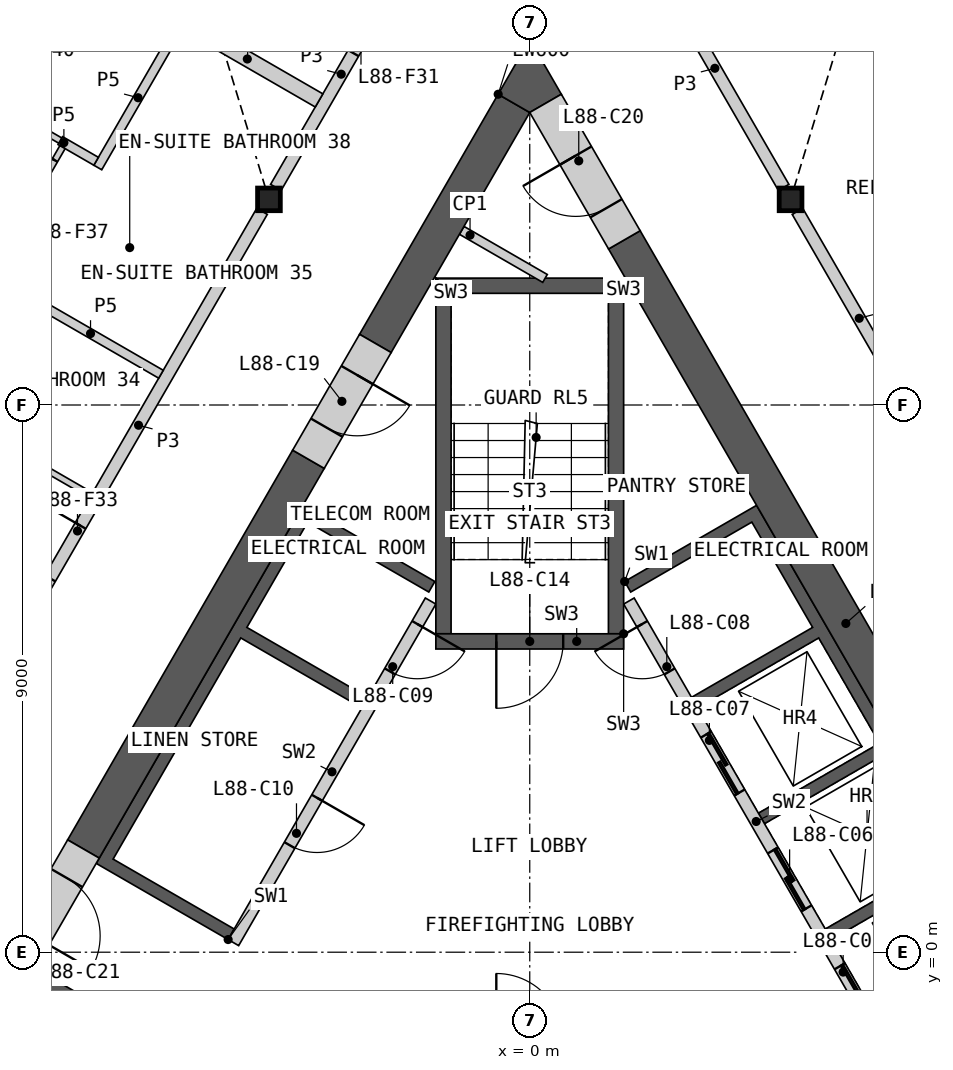
"""IFC4 building model, lengths in metres.
Left out: names, types, materials, properties, quantities, classifications, styles, units other than length and angle.
Written with IfcOpenShell. Run it as: python <this file> out.ifc"""

import sys

from ifc_helpers import new_model, si_unit, direction, frame, frame_2d, origin, origin_2d, place, context, subcontext, project, spatial, polyline, rectangle, i_section, outline, extrude, element, fill, save


model = new_model("IFC4")
c1 = context("Model", 3, precision=1e-05, world=origin(), true_north=direction((0.0, 1.0)))
c2 = subcontext(c1, "Body", "Model", "MODEL_VIEW")
j1 = project(units=[si_unit("LENGTHUNIT", "METRE"), si_unit("PLANEANGLEUNIT", "RADIAN")], contexts=[c1])
p1 = place(None, origin())
s1 = spatial("IfcSite", under=j1, at=p1, CompositionType="ELEMENT")
p2 = place(p1, origin())
s2 = spatial("IfcBuilding", under=s1, at=p2, CompositionType="ELEMENT")
p3 = place(p2, frame((0.0, 0.0, 388.2)))
s3 = spatial("IfcBuildingStorey", under=s2, at=p3, CompositionType="ELEMENT", Elevation=388.2)
for number, where, z_axis, x_axis in (
    (1, (-4.289, 12.382, 0.0), (0.0, 0.0, 1.0), (1.0, 0.0, 0.0)),
    (2, (4.289, 12.382, 0.0), (0.0, 0.0, 1.0), (1.0, 0.0, 0.0)),
):
    element("IfcColumn", number, at=place(p3, frame(where, z_axis=z_axis, x_axis=x_axis)), inside=s3, PredefinedType="COLUMN", context=c2, shape_type="SweptSolid", body=[
        extrude(i_section(OverallWidth=0.374, OverallDepth=0.372, WebThickness=0.016, FlangeThickness=0.026, at=origin_2d()), origin(), (0.0, 0.0, 1.0), 3.4),
    ])
p4 = place(p3, origin())
e3 = element("IfcWall", 3, at=p4, inside=s3, PredefinedType="SHEAR", context=c2, shape_type="SweptSolid", body=[
    extrude(outline(polyline([(1.561, 6.097), (3.731, 7.35), (8.231, -0.444), (6.061, -1.697), (5.96, -1.524), (7.952, -0.374), (6.952, 1.358), (4.96, 0.208), (4.861, 0.381), (6.852, 1.531), (5.852, 3.263), (3.861, 2.113), (3.76, 2.287), (5.752, 3.437), (4.752, 5.169), (2.76, 4.019), (2.66, 4.192), (4.652, 5.342), (3.652, 7.074), (1.66, 5.924), (1.561, 6.097)])), origin(), (0.0, 0.0, 1.0), 3.1),
])
p5 = place(p3, frame((5.817, -1.476, 0.0), z_axis=(0.0, 0.0, 1.0), x_axis=(-0.500002616675, 0.866023893041, 0.0)))
e4 = element("IfcWall", 4, at=p5, inside=s3, PredefinedType="SOLIDWALL", context=c2, shape_type="SweptSolid", body=[
    extrude(rectangle(XDim=8.373, YDim=0.2, at=frame_2d((4.187, 0.0))), origin(), (0.0, 0.0, 1.0), 3.1),
])
p6 = place(p5, frame((0.337, 0.0, 0.0)))
e5 = element("IfcOpeningElement", 5, at=p6, cuts=e4, PredefinedType="OPENING", context=c2, shape_type="SweptSolid", body=[
    extrude(rectangle(XDim=1.1, YDim=2.1, at=frame_2d((0.55, 1.05))), frame((0.0, 0.11, 0.0), z_axis=(0.0, -1.0, 0.0), x_axis=(1.0, 0.0, 0.0)), (0.0, 0.0, 1.0), 0.22),
])
p7 = place(p5, frame((2.537, 0.0, 0.0)))
e6 = element("IfcOpeningElement", 6, at=p7, cuts=e4, PredefinedType="OPENING", context=c2, shape_type="SweptSolid", body=[
    extrude(rectangle(XDim=1.1, YDim=2.1, at=frame_2d((0.55, 1.05))), frame((0.0, 0.11, 0.0), z_axis=(0.0, -1.0, 0.0), x_axis=(1.0, 0.0, 0.0)), (0.0, 0.0, 1.0), 0.22),
])
p8 = place(p5, frame((4.737, 0.0, 0.0)))
e7 = element("IfcOpeningElement", 7, at=p8, cuts=e4, PredefinedType="OPENING", context=c2, shape_type="SweptSolid", body=[
    extrude(rectangle(XDim=1.1, YDim=2.1, at=frame_2d((0.55, 1.05))), frame((0.0, 0.11, 0.0), z_axis=(0.0, -1.0, 0.0), x_axis=(1.0, 0.0, 0.0)), (0.0, 0.0, 1.0), 0.22),
])
p9 = place(p5, frame((7.037, 0.0, 0.0)))
e8 = element("IfcOpeningElement", 8, at=p9, cuts=e4, PredefinedType="OPENING", context=c2, shape_type="SweptSolid", body=[
    extrude(rectangle(XDim=0.9, YDim=2.1, at=frame_2d((0.45, 1.05))), frame((0.0, 0.11, 0.0), z_axis=(0.0, -1.0, 0.0), x_axis=(1.0, 0.0, 0.0)), (0.0, 0.0, 1.0), 0.22),
])
p10 = place(p3, origin())
e9 = element("IfcWall", 9, at=p10, inside=s3, PredefinedType="SHEAR", context=c2, shape_type="SweptSolid", body=[
    extrude(outline(polyline([(-6.061, -1.697), (-8.231, -0.444), (-8.131, -0.271), (-5.96, -1.524), (-6.061, -1.697)])), origin(), (0.0, 0.0, 1.0), 3.1),
])
p11 = place(p3, origin())
e10 = element("IfcWall", 10, at=p11, inside=s3, PredefinedType="SHEAR", context=c2, shape_type="SweptSolid", body=[
    extrude(outline(polyline([(-4.96, 0.208), (-7.131, 1.461), (-3.731, 7.35), (-1.561, 6.097), (-1.66, 5.924), (-3.652, 7.074), (-4.652, 5.342), (-2.66, 4.192), (-2.76, 4.019), (-4.752, 5.169), (-6.852, 1.531), (-4.861, 0.381), (-4.96, 0.208)])), origin(), (0.0, 0.0, 1.0), 3.1),
])
p12 = place(p3, frame((-1.631, 5.776, 0.0), z_axis=(0.0, 0.0, 1.0), x_axis=(-0.499992876559, -0.866029516466, 0.0)))
e11 = element("IfcWall", 11, at=p12, inside=s3, PredefinedType="SOLIDWALL", context=c2, shape_type="SweptSolid", body=[
    extrude(rectangle(XDim=6.486, YDim=0.2, at=frame_2d((3.243, 0.0))), origin(), (0.0, 0.0, 1.0), 3.1),
])
p13 = place(p12, frame((0.437, 0.0, 0.0)))
e12 = element("IfcOpeningElement", 12, at=p13, cuts=e11, PredefinedType="OPENING", context=c2, shape_type="SweptSolid", body=[
    extrude(rectangle(XDim=0.9, YDim=2.1, at=frame_2d((0.45, 1.05))), frame((0.0, 0.11, 0.0), z_axis=(0.0, -1.0, 0.0), x_axis=(1.0, 0.0, 0.0)), (0.0, 0.0, 1.0), 0.22),
])
p14 = place(p12, frame((3.737, 0.0, 0.0)))
e13 = element("IfcOpeningElement", 13, at=p14, cuts=e11, PredefinedType="OPENING", context=c2, shape_type="SweptSolid", body=[
    extrude(rectangle(XDim=0.9, YDim=2.1, at=frame_2d((0.45, 1.05))), frame((0.0, 0.11, 0.0), z_axis=(0.0, -1.0, 0.0), x_axis=(1.0, 0.0, 0.0)), (0.0, 0.0, 1.0), 0.22),
])
p15 = place(p3, origin())
e14 = element("IfcWall", 14, at=p15, inside=s3, PredefinedType="SHEAR", context=c2, shape_type="SweptSolid", body=[
    extrude(outline(polyline([(1.544, 5.237), (1.544, 11.087), (1.294, 10.837), (1.294, 5.237), (1.544, 5.237)])), origin(), (0.0, 0.0, 1.0), 3.1),
])
p16 = place(p3, origin())
e15 = element("IfcWall", 15, at=p16, inside=s3, PredefinedType="SHEAR", context=c2, shape_type="SweptSolid", body=[
    extrude(outline(polyline([(1.544, 11.087), (-1.544, 11.087), (-1.294, 10.837), (1.294, 10.837), (1.544, 11.087)])), origin(), (0.0, 0.0, 1.0), 3.1),
])
p17 = place(p3, origin())
e16 = element("IfcWall", 16, at=p17, inside=s3, PredefinedType="SHEAR", context=c2, shape_type="SweptSolid", body=[
    extrude(outline(polyline([(-1.294, 10.837), (-1.544, 11.087), (-1.544, 5.237), (-1.294, 5.237), (-1.294, 10.837)])), origin(), (0.0, 0.0, 1.0), 3.1),
])
p18 = place(p3, frame((1.544, 5.112, 0.0), z_axis=(0.0, 0.0, 1.0), x_axis=(-1.0, 0.0, 0.0)))
e17 = element("IfcWall", 17, at=p18, inside=s3, PredefinedType="SHEAR", context=c2, shape_type="SweptSolid", body=[
    extrude(rectangle(XDim=3.088, YDim=0.25, at=frame_2d((1.544, 0.0))), origin(), (0.0, 0.0, 1.0), 3.1),
])
p19 = place(p18, frame((0.994, 0.0, 0.0)))
e18 = element("IfcOpeningElement", 18, at=p19, cuts=e17, PredefinedType="OPENING", context=c2, shape_type="SweptSolid", body=[
    extrude(rectangle(XDim=1.1, YDim=2.1, at=frame_2d((0.55, 1.05))), frame((0.0, 0.135, 0.0), z_axis=(0.0, -1.0, 0.0), x_axis=(1.0, 0.0, 0.0)), (0.0, 0.0, 1.0), 0.27),
])
p20 = place(p3, frame((-1.119, 11.873, 0.0), z_axis=(0.0, 0.0, 1.0), x_axis=(0.865992812752, -0.500056445075, 0.0)))
e19 = element("IfcWall", 19, at=p20, inside=s3, PredefinedType="PARTITIONING", context=c2, shape_type="SweptSolid", body=[
    extrude(rectangle(XDim=1.582, YDim=0.15, at=frame_2d((0.791, 0.0))), origin(), (0.0, 0.0, 1.0), 3.1),
])
p21 = place(p3, frame((8.841, -0.902, 0.0), z_axis=(0.0, 0.0, 1.0), x_axis=(-0.499995618375, 0.866027933502, 0.0)))
e20 = element("IfcWall", 20, at=p21, inside=s3, PredefinedType="SHEAR", context=c2, shape_type="SweptSolid", body=[
    extrude(rectangle(XDim=14.571, YDim=0.6, at=frame_2d((7.285, 0.0))), origin(), (0.0, 0.0, 1.0), 3.1),
])
p22 = place(p3, frame((-3.639, 8.107, 0.0), z_axis=(0.0, 0.0, 1.0), x_axis=(-0.49999180351, -0.866030135978, 0.0)))
e21 = element("IfcWall", 21, at=p22, inside=s3, PredefinedType="SHEAR", context=c2, shape_type="SweptSolid", body=[
    extrude(rectangle(XDim=7.401, YDim=0.6, at=frame_2d((3.701, 0.0))), origin(), (0.0, 0.0, 1.0), 3.1),
])
p23 = place(p3, frame((-0.26, 13.961, 0.0), z_axis=(0.0, 0.0, 1.0), x_axis=(-0.499980485389, -0.866036670257, 0.0)))
e22 = element("IfcWall", 22, at=p23, inside=s3, PredefinedType="SHEAR", context=c2, shape_type="SweptSolid", body=[
    extrude(rectangle(XDim=4.559, YDim=0.6, at=frame_2d((2.28, 0.0))), origin(), (0.0, 0.0, 1.0), 3.1),
])
p24 = place(p3, origin())
e23 = element("IfcWall", 23, at=p24, inside=s3, PredefinedType="SHEAR", context=c2, shape_type="SweptSolid", body=[
    extrude(outline(polyline([(-0.52, 14.111), (0.0, 15.011), (0.52, 14.111), (0.0, 13.811), (-0.52, 14.111)])), origin(), (0.0, 0.0, 1.0), 3.1),
])
p25 = place(p3, frame((-2.539, 10.013, 0.0), z_axis=(0.0, 0.0, 1.0), x_axis=(-0.50002983664, -0.866008176907, 0.0)))
e24 = element("IfcWall", 24, at=p25, inside=s3, PredefinedType="SHEAR", context=c2, shape_type="SweptSolid", body=[
    extrude(rectangle(XDim=2.2, YDim=0.6, at=frame_2d((1.1, 0.0))), origin(), (0.0, 0.0, 1.0), 3.1),
])
p26 = place(p25, frame((0.6, 0.0, 0.0)))
e25 = element("IfcOpeningElement", 25, at=p26, cuts=e24, PredefinedType="OPENING", context=c2, shape_type="SweptSolid", body=[
    extrude(rectangle(XDim=1.0, YDim=2.1, at=frame_2d((0.5, 1.05))), frame((0.0, 0.31, 0.0), z_axis=(0.0, -1.0, 0.0), x_axis=(1.0, 0.0, 0.0)), (0.0, 0.0, 1.0), 0.62),
])
p27 = place(p3, frame((1.556, 11.716, 0.0), z_axis=(0.0, 0.0, 1.0), x_axis=(-0.500018667571, 0.866014625789, 0.0)))
e26 = element("IfcWall", 26, at=p27, inside=s3, PredefinedType="SHEAR", context=c2, shape_type="SweptSolid", body=[
    extrude(rectangle(XDim=2.592, YDim=0.6, at=frame_2d((1.296, 0.0))), origin(), (0.0, 0.0, 1.0), 3.1),
])
p28 = place(p27, frame((0.6, 0.0, 0.0)))
e27 = element("IfcOpeningElement", 27, at=p28, cuts=e26, PredefinedType="OPENING", context=c2, shape_type="SweptSolid", body=[
    extrude(rectangle(XDim=1.0, YDim=2.1, at=frame_2d((0.5, 1.05))), frame((0.0, 0.31, 0.0), z_axis=(0.0, -1.0, 0.0), x_axis=(1.0, 0.0, 0.0)), (0.0, 0.0, 1.0), 0.62),
])
p29 = place(p3, frame((-7.34, 1.698, 0.0), z_axis=(0.0, 0.0, 1.0), x_axis=(-0.50002983664, -0.866008176907, 0.0)))
e28 = element("IfcWall", 28, at=p29, inside=s3, PredefinedType="SHEAR", context=c2, shape_type="SweptSolid", body=[
    extrude(rectangle(XDim=2.2, YDim=0.6, at=frame_2d((1.1, 0.0))), origin(), (0.0, 0.0, 1.0), 3.1),
])
p30 = place(p29, frame((0.55, 0.0, 0.0)))
e29 = element("IfcOpeningElement", 29, at=p30, cuts=e28, PredefinedType="OPENING", context=c2, shape_type="SweptSolid", body=[
    extrude(rectangle(XDim=1.1, YDim=2.1, at=frame_2d((0.55, 1.05))), frame((0.0, 0.31, 0.0), z_axis=(0.0, -1.0, 0.0), x_axis=(1.0, 0.0, 0.0)), (0.0, 0.0, 1.0), 0.62),
])
p31 = place(p3, frame((4.403, 12.185, 0.0), z_axis=(0.0, 0.0, 1.0), x_axis=(0.499992155518, -0.866029932751, 0.0)))
e30 = element("IfcWall", 30, at=p31, inside=s3, PredefinedType="PARTITIONING", context=c2, shape_type="SweptSolid", body=[
    extrude(rectangle(XDim=8.123, YDim=0.2, at=frame_2d((4.062, 0.0))), origin(), (0.0, 0.0, 1.0), 3.1),
])
p32 = place(p31, frame((3.587, 0.0, 0.0)))
e31 = element("IfcOpeningElement", 31, at=p32, cuts=e30, PredefinedType="OPENING", context=c2, shape_type="SweptSolid", body=[
    extrude(rectangle(XDim=0.95, YDim=2.1, at=frame_2d((0.475, 1.05))), frame((0.0, 0.11, 0.0), z_axis=(0.0, -1.0, 0.0), x_axis=(1.0, 0.0, 0.0)), (0.0, 0.0, 1.0), 0.22),
])
p33 = place(p3, frame((-8.465, 5.15, 0.0), z_axis=(0.0, 0.0, 1.0), x_axis=(0.499992155518, 0.866029932751, 0.0)))
e32 = element("IfcWall", 32, at=p33, inside=s3, PredefinedType="PARTITIONING", context=c2, shape_type="SweptSolid", body=[
    extrude(rectangle(XDim=8.123, YDim=0.2, at=frame_2d((4.062, 0.0))), origin(), (0.0, 0.0, 1.0), 3.1),
])
p34 = place(p33, frame((1.153, 0.0, 0.0)))
e33 = element("IfcOpeningElement", 33, at=p34, cuts=e32, PredefinedType="OPENING", context=c2, shape_type="SweptSolid", body=[
    extrude(rectangle(XDim=1.0, YDim=2.1, at=frame_2d((0.5, 1.05))), frame((0.0, 0.11, 0.0), z_axis=(0.0, -1.0, 0.0), x_axis=(1.0, 0.0, 0.0)), (0.0, 0.0, 1.0), 0.22),
])
p35 = place(p3, frame((1.913, 16.498, 0.0), z_axis=(0.0, 0.0, 1.0), x_axis=(0.499974648164, -0.866040040179, 0.0)))
e34 = element("IfcWall", 34, at=p35, inside=s3, PredefinedType="PARTITIONING", context=c2, shape_type="SweptSolid", body=[
    extrude(rectangle(XDim=4.525, YDim=0.2, at=frame_2d((2.263, 0.0))), origin(), (0.0, 0.0, 1.0), 3.1),
])
p36 = place(p3, frame((-4.176, 12.579, 0.0), z_axis=(0.0, 0.0, 1.0), x_axis=(0.500004215162, 0.866022970146, 0.0)))
e35 = element("IfcWall", 35, at=p36, inside=s3, PredefinedType="PARTITIONING", context=c2, shape_type="SweptSolid", body=[
    extrude(rectangle(XDim=4.3, YDim=0.2, at=frame_2d((2.15, 0.0))), origin(), (0.0, 0.0, 1.0), 3.1),
])
p37 = place(p36, frame((2.55, 0.0, 0.0)))
e36 = element("IfcOpeningElement", 36, at=p37, cuts=e35, PredefinedType="OPENING", context=c2, shape_type="SweptSolid", body=[
    extrude(rectangle(XDim=1.0, YDim=2.1, at=frame_2d((0.5, 1.05))), frame((0.0, 0.11, 0.0), z_axis=(0.0, -1.0, 0.0), x_axis=(1.0, 0.0, 0.0)), (0.0, 0.0, 1.0), 0.22),
])
p38 = place(p3, frame((-5.825, 15.372, 0.0), z_axis=(0.0, 0.0, 1.0), x_axis=(0.866051307416, -0.49995513091, 0.0)))
e37 = element("IfcWall", 37, at=p38, inside=s3, PredefinedType="PARTITIONING", context=c2, shape_type="SweptSolid", body=[
    extrude(rectangle(XDim=2.725, YDim=0.25, at=frame_2d((1.362, 0.0))), origin(), (0.0, 0.0, 1.0), 2.33),
])
p39 = place(p3, frame((3.926, 19.811, 0.0), z_axis=(0.0, 0.0, 1.0), x_axis=(0.500001082559, -0.866024778768, 0.0)))
e38 = element("IfcWall", 38, at=p39, inside=s3, PredefinedType="PARTITIONING", context=c2, shape_type="SweptSolid", body=[
    extrude(rectangle(XDim=15.094, YDim=0.2, at=frame_2d((7.547, 0.0))), origin(), (0.0, 0.0, 1.0), 2.33),
])
p40 = place(p39, frame((3.761, 0.0, 0.0)))
e39 = element("IfcOpeningElement", 39, at=p40, cuts=e38, PredefinedType="OPENING", context=c2, shape_type="SweptSolid", body=[
    extrude(rectangle(XDim=0.95, YDim=2.1, at=frame_2d((0.475, 1.05))), frame((0.0, 0.11, 0.0), z_axis=(0.0, -1.0, 0.0), x_axis=(1.0, 0.0, 0.0)), (0.0, 0.0, 1.0), 0.22),
])
p41 = place(p3, frame((-8.382, 10.844, 0.0), z_axis=(0.0, 0.0, 1.0), x_axis=(0.866021425885, -0.500006889861, 0.0)))
e40 = element("IfcWall", 40, at=p41, inside=s3, PredefinedType="PLUMBINGWALL", context=c2, shape_type="SweptSolid", body=[
    extrude(rectangle(XDim=2.675, YDim=0.15, at=frame_2d((1.337, 0.0))), origin(), (0.0, 0.0, 1.0), 2.33),
])
p42 = place(p3, frame((-7.104, 12.906, 0.0), z_axis=(0.0, 0.0, 1.0), x_axis=(0.499993606316, 0.866029095148, 0.0)))
e41 = element("IfcWall", 41, at=p42, inside=s3, PredefinedType="PLUMBINGWALL", context=c2, shape_type="SweptSolid", body=[
    extrude(rectangle(XDim=2.65, YDim=0.15, at=frame_2d((1.325, 0.0))), origin(), (0.0, 0.0, 1.0), 2.33),
])
p43 = place(p3, frame((-7.72, 13.349, 0.0), z_axis=(0.0, 0.0, 1.0), x_axis=(0.866113839764, -0.499846793097, 0.0)))
e42 = element("IfcWall", 42, at=p43, inside=s3, PredefinedType="PLUMBINGWALL", context=c2, shape_type="SweptSolid", body=[
    extrude(rectangle(XDim=0.68, YDim=0.15, at=frame_2d((0.34, 0.0))), origin(), (0.0, 0.0, 1.0), 2.33),
])
p44 = place(p3, frame((-9.517, 14.328, 0.0), z_axis=(0.0, 0.0, 1.0), x_axis=(0.499996545922, 0.866027397988, 0.0)))
e43 = element("IfcWall", 43, at=p44, inside=s3, PredefinedType="PARTITIONING", context=c2, shape_type="SweptSolid", body=[
    extrude(rectangle(XDim=5.5, YDim=0.1, at=frame_2d((2.75, 0.0))), origin(), (0.0, 0.0, 1.0), 2.33),
])
p45 = place(p44, frame((4.3, 0.0, 0.0)))
e44 = element("IfcOpeningElement", 44, at=p45, cuts=e43, PredefinedType="OPENING", context=c2, shape_type="SweptSolid", body=[
    extrude(rectangle(XDim=0.95, YDim=2.1, at=frame_2d((0.475, 1.05))), frame((0.0, 0.06, 0.0), z_axis=(0.0, -1.0, 0.0), x_axis=(1.0, 0.0, 0.0)), (0.0, 0.0, 1.0), 0.12),
])
p46 = place(p44, frame((0.25, 0.0, 0.0)))
e45 = element("IfcOpeningElement", 45, at=p46, cuts=e43, PredefinedType="OPENING", context=c2, shape_type="SweptSolid", body=[
    extrude(rectangle(XDim=0.95, YDim=2.1, at=frame_2d((0.475, 1.05))), frame((0.0, 0.06, 0.0), z_axis=(0.0, -1.0, 0.0), x_axis=(1.0, 0.0, 0.0)), (0.0, 0.0, 1.0), 0.12),
])
p47 = place(p3, frame((-9.51, 8.839, 0.0), z_axis=(0.0, 0.0, 1.0), x_axis=(0.866029095148, -0.499993606316, 0.0)))
e46 = element("IfcWall", 46, at=p47, inside=s3, PredefinedType="PARTITIONING", context=c2, shape_type="SweptSolid", body=[
    extrude(rectangle(XDim=2.65, YDim=0.1, at=frame_2d((1.325, 0.0))), origin(), (0.0, 0.0, 1.0), 2.33),
])
p48 = place(p3, frame((-8.872, 11.184, 0.0), z_axis=(0.0, 0.0, 1.0), x_axis=(0.499986429846, 0.866033238375, 0.0)))
e47 = element("IfcWall", 47, at=p48, inside=s3, PredefinedType="PARTITIONING", context=c2, shape_type="SweptSolid", body=[
    extrude(rectangle(XDim=2.375, YDim=0.1, at=frame_2d((1.188, 0.0))), origin(), (0.0, 0.0, 1.0), 2.33),
])
p49 = place(p48, frame((1.175, 0.0, 0.0)))
e48 = element("IfcOpeningElement", 48, at=p49, cuts=e47, PredefinedType="OPENING", context=c2, shape_type="SweptSolid", body=[
    extrude(rectangle(XDim=0.95, YDim=2.1, at=frame_2d((0.475, 1.05))), frame((0.0, 0.06, 0.0), z_axis=(0.0, -1.0, 0.0), x_axis=(1.0, 0.0, 0.0)), (0.0, 0.0, 1.0), 0.12),
])
p50 = place(p3, frame((-9.448, 14.346, 0.0), z_axis=(0.0, 0.0, 1.0), x_axis=(0.866020521143, -0.500008456887, 0.0)))
e49 = element("IfcWall", 49, at=p50, inside=s3, PredefinedType="PARTITIONING", context=c2, shape_type="SweptSolid", body=[
    extrude(rectangle(XDim=1.995, YDim=0.1, at=frame_2d((0.998, 0.0))), origin(), (0.0, 0.0, 1.0), 2.33),
])
p51 = place(p6, origin())
e50 = element("IfcDoor", 50, at=p51, inside=s3, OperationType="SLIDING_TO_LEFT", PredefinedType="DOOR", context=c2, shape_type="SweptSolid", body=[
    extrude(rectangle(XDim=1.1, YDim=2.1, at=frame_2d((0.55, 1.05))), frame((0.0, 0.025, 0.0), z_axis=(0.0, -1.0, 0.0), x_axis=(1.0, 0.0, 0.0)), (0.0, 0.0, 1.0), 0.05),
])
fill(e5, e50)
p52 = place(p7, origin())
e51 = element("IfcDoor", 51, at=p52, inside=s3, OperationType="SLIDING_TO_LEFT", PredefinedType="DOOR", context=c2, shape_type="SweptSolid", body=[
    extrude(rectangle(XDim=1.1, YDim=2.1, at=frame_2d((0.55, 1.05))), frame((0.0, 0.025, 0.0), z_axis=(0.0, -1.0, 0.0), x_axis=(1.0, 0.0, 0.0)), (0.0, 0.0, 1.0), 0.05),
])
fill(e6, e51)
p53 = place(p8, origin())
e52 = element("IfcDoor", 52, at=p53, inside=s3, OperationType="SLIDING_TO_LEFT", PredefinedType="DOOR", context=c2, shape_type="SweptSolid", body=[
    extrude(rectangle(XDim=1.1, YDim=2.1, at=frame_2d((0.55, 1.05))), frame((0.0, 0.025, 0.0), z_axis=(0.0, -1.0, 0.0), x_axis=(1.0, 0.0, 0.0)), (0.0, 0.0, 1.0), 0.05),
])
fill(e7, e52)
p54 = place(p9, origin())
e53 = element("IfcDoor", 53, at=p54, inside=s3, OperationType="SINGLE_SWING_RIGHT", PredefinedType="DOOR", context=c2, shape_type="SweptSolid", body=[
    extrude(rectangle(XDim=0.9, YDim=2.1, at=frame_2d((0.45, 1.05))), frame((0.0, 0.025, 0.0), z_axis=(0.0, -1.0, 0.0), x_axis=(1.0, 0.0, 0.0)), (0.0, 0.0, 1.0), 0.05),
])
fill(e8, e53)
p55 = place(p13, origin())
e54 = element("IfcDoor", 54, at=p55, inside=s3, OperationType="SINGLE_SWING_LEFT", PredefinedType="DOOR", context=c2, shape_type="SweptSolid", body=[
    extrude(rectangle(XDim=0.9, YDim=2.1, at=frame_2d((0.45, 1.05))), frame((0.0, 0.025, 0.0), z_axis=(0.0, -1.0, 0.0), x_axis=(1.0, 0.0, 0.0)), (0.0, 0.0, 1.0), 0.05),
])
fill(e12, e54)
p56 = place(p14, origin())
e55 = element("IfcDoor", 55, at=p56, inside=s3, OperationType="SINGLE_SWING_LEFT", PredefinedType="DOOR", context=c2, shape_type="SweptSolid", body=[
    extrude(rectangle(XDim=0.9, YDim=2.1, at=frame_2d((0.45, 1.05))), frame((0.0, 0.025, 0.0), z_axis=(0.0, -1.0, 0.0), x_axis=(1.0, 0.0, 0.0)), (0.0, 0.0, 1.0), 0.05),
])
fill(e13, e55)
p57 = place(p19, origin())
e56 = element("IfcDoor", 56, at=p57, inside=s3, OperationType="SINGLE_SWING_RIGHT", PredefinedType="DOOR", context=c2, shape_type="SweptSolid", body=[
    extrude(rectangle(XDim=1.1, YDim=2.1, at=frame_2d((0.55, 1.05))), frame((0.0, 0.025, 0.0), z_axis=(0.0, -1.0, 0.0), x_axis=(1.0, 0.0, 0.0)), (0.0, 0.0, 1.0), 0.05),
])
fill(e18, e56)
p58 = place(p26, origin())
e57 = element("IfcDoor", 57, at=p58, inside=s3, OperationType="SINGLE_SWING_LEFT", PredefinedType="DOOR", context=c2, shape_type="SweptSolid", body=[
    extrude(rectangle(XDim=1.0, YDim=2.1, at=frame_2d((0.5, 1.05))), frame((0.0, 0.055, 0.0), z_axis=(0.0, -1.0, 0.0), x_axis=(1.0, 0.0, 0.0)), (0.0, 0.0, 1.0), 0.05),
])
fill(e25, e57)
p59 = place(p28, origin())
e58 = element("IfcDoor", 58, at=p59, inside=s3, OperationType="SINGLE_SWING_RIGHT", PredefinedType="DOOR", context=c2, shape_type="SweptSolid", body=[
    extrude(rectangle(XDim=1.0, YDim=2.1, at=frame_2d((0.5, 1.05))), frame((0.0, 0.055, 0.0), z_axis=(0.0, -1.0, 0.0), x_axis=(1.0, 0.0, 0.0)), (0.0, 0.0, 1.0), 0.05),
])
fill(e27, e58)
p60 = place(p30, origin())
e59 = element("IfcDoor", 59, at=p60, inside=s3, OperationType="SINGLE_SWING_RIGHT", PredefinedType="DOOR", context=c2, shape_type="SweptSolid", body=[
    extrude(rectangle(XDim=1.1, YDim=2.1, at=frame_2d((0.55, 1.05))), frame((0.0, 0.055, 0.0), z_axis=(0.0, -1.0, 0.0), x_axis=(1.0, 0.0, 0.0)), (0.0, 0.0, 1.0), 0.05),
])
fill(e29, e59)
p61 = place(p37, origin())
e60 = element("IfcDoor", 60, at=p61, inside=s3, OperationType="SINGLE_SWING_RIGHT", PredefinedType="DOOR", context=c2, shape_type="SweptSolid", body=[
    extrude(rectangle(XDim=1.0, YDim=2.1, at=frame_2d((0.5, 1.05))), frame((0.0, 0.025, 0.0), z_axis=(0.0, -1.0, 0.0), x_axis=(1.0, 0.0, 0.0)), (0.0, 0.0, 1.0), 0.05),
])
fill(e36, e60)
p62 = place(p34, origin())
e61 = element("IfcDoor", 61, at=p62, inside=s3, OperationType="SINGLE_SWING_RIGHT", PredefinedType="DOOR", context=c2, shape_type="SweptSolid", body=[
    extrude(rectangle(XDim=1.0, YDim=2.1, at=frame_2d((0.5, 1.05))), frame((0.0, 0.025, 0.0), z_axis=(0.0, -1.0, 0.0), x_axis=(1.0, 0.0, 0.0)), (0.0, 0.0, 1.0), 0.05),
])
fill(e33, e61)
p63 = place(p49, origin())
e62 = element("IfcDoor", 62, at=p63, inside=s3, OperationType="SINGLE_SWING_RIGHT", PredefinedType="DOOR", context=c2, shape_type="SweptSolid", body=[
    extrude(rectangle(XDim=0.95, YDim=2.1, at=frame_2d((0.475, 1.05))), frame((0.0, 0.025, 0.0), z_axis=(0.0, -1.0, 0.0), x_axis=(1.0, 0.0, 0.0)), (0.0, 0.0, 1.0), 0.05),
])
fill(e48, e62)
save(model, sys.argv[1])
